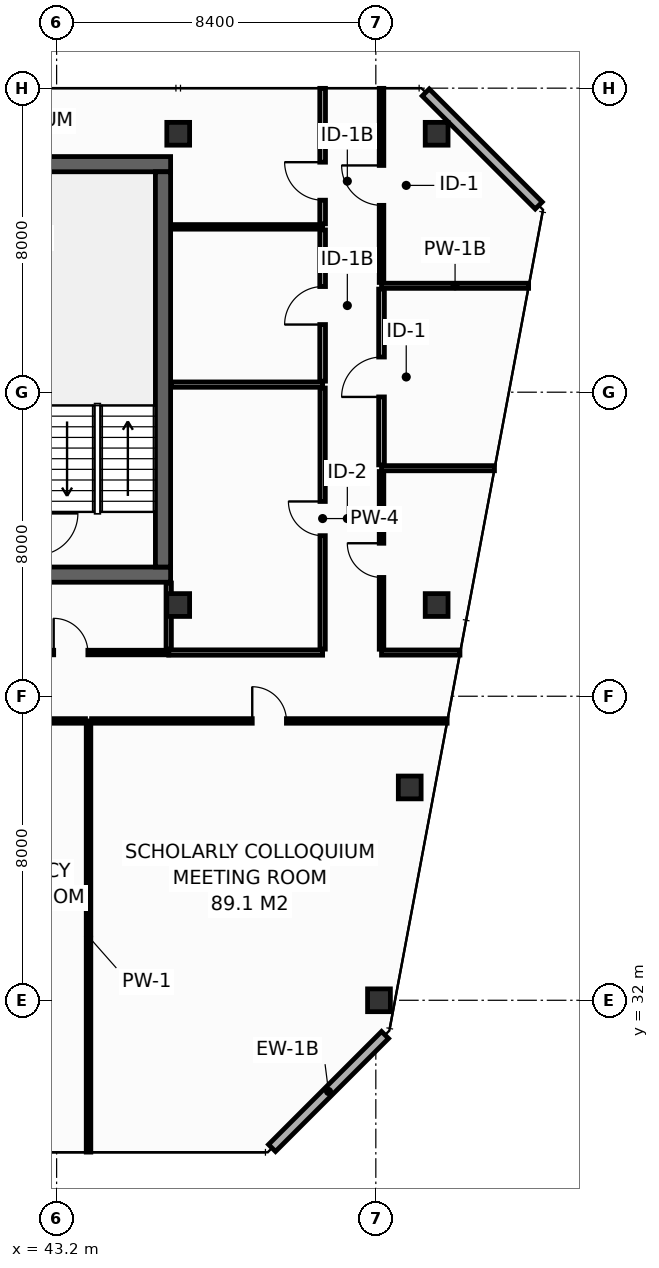
"""IFC4 building model, lengths in metres.
Left out: names, types, materials, properties, quantities, classifications, styles, units other than length and angle.
Written with IfcOpenShell. Run it as: python <this file> out.ifc"""

import sys

from ifc_helpers import new_model, si_unit, direction, frame, frame_2d, origin, origin_2d, place, context, subcontext, project, spatial, rectangle, hollow_rectangle, extrude, element, fill, save


model = new_model("IFC4")
c1 = context("Model", 3, precision=1e-05, world=origin(), true_north=direction((0.0, 1.0)))
c2 = subcontext(c1, "Body", "Model", "MODEL_VIEW")
j1 = project(units=[si_unit("LENGTHUNIT", "METRE"), si_unit("PLANEANGLEUNIT", "RADIAN")], contexts=[c1])
p1 = place(None, origin())
s1 = spatial("IfcSite", under=j1, at=p1, CompositionType="ELEMENT")
p2 = place(p1, origin())
s2 = spatial("IfcBuilding", under=s1, at=p2, CompositionType="ELEMENT")
p3 = place(p2, frame((0.0, 0.0, 291.4)))
s3 = spatial("IfcBuildingStorey", under=s2, at=p3, CompositionType="ELEMENT", Elevation=291.4)
p4 = place(p3, frame((13.7, 43.2, 0.0), z_axis=(0.0, 0.0, 1.0), x_axis=(1.0, 0.0, 0.0)))
e1 = element("IfcWall", 1, at=p4, inside=s3, PredefinedType="SHEAR", context=c2, shape_type="SweptSolid", body=[
    extrude(rectangle(XDim=32.5, YDim=0.4, at=frame_2d((16.25, 0.0))), origin(), (0.0, 0.0, 1.0), 3.55),
])
p5 = place(p4, frame((5.4, 0.0, 0.0)))
e2 = element("IfcOpeningElement", 2, at=p5, cuts=e1, PredefinedType="OPENING", context=c2, shape_type="SweptSolid", body=[
    extrude(rectangle(XDim=1.1, YDim=2.15, at=frame_2d((0.55, 1.075))), frame((0.0, 0.21, 0.0), z_axis=(0.0, -1.0, 0.0), x_axis=(1.0, 0.0, 0.0)), (0.0, 0.0, 1.0), 0.42),
])
p6 = place(p4, frame((25.6, 0.0, 0.0)))
e3 = element("IfcOpeningElement", 3, at=p6, cuts=e1, PredefinedType="OPENING", context=c2, shape_type="SweptSolid", body=[
    extrude(rectangle(XDim=1.1, YDim=2.15, at=frame_2d((0.55, 1.075))), frame((0.0, 0.21, 0.0), z_axis=(0.0, -1.0, 0.0), x_axis=(1.0, 0.0, 0.0)), (0.0, 0.0, 1.0), 0.42),
])
p7 = place(p3, frame((13.7, 54.0, 0.0), z_axis=(0.0, 0.0, 1.0), x_axis=(1.0, 0.0, 0.0)))
e4 = element("IfcWall", 4, at=p7, inside=s3, PredefinedType="SHEAR", context=c2, shape_type="SweptSolid", body=[
    extrude(rectangle(XDim=32.5, YDim=0.4, at=frame_2d((16.25, 0.0))), origin(), (0.0, 0.0, 1.0), 3.55),
])
p8 = place(p3, frame((46.0, 43.4, 0.0), z_axis=(0.0, 0.0, 1.0), x_axis=(0.0, 1.0, 0.0)))
e5 = element("IfcWall", 5, at=p8, inside=s3, PredefinedType="SHEAR", context=c2, shape_type="SweptSolid", body=[
    extrude(rectangle(XDim=10.4, YDim=0.4, at=frame_2d((5.2, 0.0))), origin(), (0.0, 0.0, 1.0), 3.55),
])
for number, where, z_axis, x_axis in (
    (6, (46.4, 54.8, 0.0), (0.0, 0.0, 1.0), (1.0, 0.0, 0.0)),
    (7, (53.2, 54.8, 0.0), (0.0, 0.0, 1.0), (1.0, 0.0, 0.0)),
    (8, (46.4, 42.4, 0.0), (0.0, 0.0, 1.0), (1.0, 0.0, 0.0)),
    (9, (53.2, 42.4, 0.0), (0.0, 0.0, 1.0), (1.0, 0.0, 0.0)),
    (10, (51.683, 32.0, 0.0), (0.0, 0.0, 1.0), (1.0, 0.0, 0.0)),
    (11, (52.492, 37.6, 0.0), (0.0, 0.0, 1.0), (1.0, 0.0, 0.0)),
):
    element("IfcColumn", number, at=place(p3, frame(where, z_axis=z_axis, x_axis=x_axis)), inside=s3, PredefinedType="COLUMN", context=c2, shape_type="SweptSolid", body=[
        extrude(hollow_rectangle(XDim=0.6, YDim=0.6, WallThickness=0.028, at=origin_2d()), origin(), (0.0, 0.0, 1.0), 3.8),
    ])
for number, where, z_axis, x_axis in (
    (12, (48.869, 28.113, 0.0), (0.0, 0.0, 1.0), (0.707, 0.707, 0.0)),
    (13, (55.887, 52.913, 0.0), (0.0, 0.0, 1.0), (-0.707, 0.707, 0.0)),
):
    element("IfcWall", number, at=place(p3, frame(where, z_axis=z_axis, x_axis=x_axis)), inside=s3, PredefinedType="STANDARD", context=c2, shape_type="SweptSolid", body=[
        extrude(rectangle(XDim=4.206, YDim=0.26, at=frame_2d((2.103, 0.0))), origin(), (0.0, 0.0, 1.0), 3.55),
    ])
p9 = place(p3, frame((46.15, 41.15, 0.0), z_axis=(0.0, 0.0, 1.0), x_axis=(1.0, 0.0, 0.0)))
e14 = element("IfcWall", 14, at=p9, inside=s3, PredefinedType="PARTITIONING", context=c2, shape_type="SweptSolid", body=[
    extrude(rectangle(XDim=4.05, YDim=0.14, at=frame_2d((2.025, 0.0))), origin(), (0.0, 0.0, 1.0), 3.55),
])
p10 = place(p3, frame((46.15, 41.24, 0.0), z_axis=(0.0, 0.0, 1.0), x_axis=(0.0, 1.0, 0.0)))
e15 = element("IfcWall", 15, at=p10, inside=s3, PredefinedType="PARTITIONING", context=c2, shape_type="SweptSolid", body=[
    extrude(rectangle(XDim=1.74, YDim=0.14, at=frame_2d((0.87, 0.0))), origin(), (0.0, 0.0, 1.0), 3.55),
])
p11 = place(p3, frame((46.22, 48.2, 0.0), z_axis=(0.0, 0.0, 1.0), x_axis=(1.0, 0.0, 0.0)))
e16 = element("IfcWall", 16, at=p11, inside=s3, PredefinedType="PARTITIONING", context=c2, shape_type="SweptSolid", body=[
    extrude(rectangle(XDim=3.98, YDim=0.14, at=frame_2d((1.99, 0.0))), origin(), (0.0, 0.0, 1.0), 3.55),
])
p12 = place(p3, frame((50.2, 41.24, 0.0), z_axis=(0.0, 0.0, 1.0), x_axis=(0.0, 1.0, 0.0)))
e17 = element("IfcWall", 17, at=p12, inside=s3, PredefinedType="PARTITIONING", context=c2, shape_type="SweptSolid", body=[
    extrude(rectangle(XDim=6.87, YDim=0.14, at=frame_2d((3.435, 0.0))), origin(), (0.0, 0.0, 1.0), 2.947),
])
p13 = place(p12, frame((2.985, 0.0, 0.0)))
e18 = element("IfcOpeningElement", 18, at=p13, cuts=e17, PredefinedType="OPENING", context=c2, shape_type="SweptSolid", body=[
    extrude(rectangle(XDim=0.9, YDim=2.1, at=frame_2d((0.45, 1.05))), frame((0.0, 0.08, 0.0), z_axis=(0.0, -1.0, 0.0), x_axis=(1.0, 0.0, 0.0)), (0.0, 0.0, 1.0), 0.16),
])
p14 = place(p3, frame((46.22, 52.35, 0.0), z_axis=(0.0, 0.0, 1.0), x_axis=(1.0, 0.0, 0.0)))
e19 = element("IfcWall", 19, at=p14, inside=s3, PredefinedType="PARTITIONING", context=c2, shape_type="SweptSolid", body=[
    extrude(rectangle(XDim=3.98, YDim=0.12, at=frame_2d((1.99, 0.0))), origin(), (0.0, 0.0, 1.0), 3.55),
])
p15 = place(p3, frame((50.2, 48.29, 0.0), z_axis=(0.0, 0.0, 1.0), x_axis=(0.0, 1.0, 0.0)))
e20 = element("IfcWall", 20, at=p15, inside=s3, PredefinedType="PARTITIONING", context=c2, shape_type="SweptSolid", body=[
    extrude(rectangle(XDim=3.98, YDim=0.15, at=frame_2d((1.99, 0.0))), origin(), (0.0, 0.0, 1.0), 3.55),
])
p16 = place(p15, frame((1.49, 0.0, 0.0)))
e21 = element("IfcOpeningElement", 21, at=p16, cuts=e20, PredefinedType="OPENING", context=c2, shape_type="SweptSolid", body=[
    extrude(rectangle(XDim=1.0, YDim=2.15, at=frame_2d((0.5, 1.075))), frame((0.0, 0.085, 0.0), z_axis=(0.0, -1.0, 0.0), x_axis=(1.0, 0.0, 0.0)), (0.0, 0.0, 1.0), 0.17),
])
p17 = place(p3, frame((50.2, 52.43, 0.0), z_axis=(0.0, 0.0, 1.0), x_axis=(0.0, 1.0, 0.0)))
e22 = element("IfcWall", 22, at=p17, inside=s3, PredefinedType="PARTITIONING", context=c2, shape_type="SweptSolid", body=[
    extrude(rectangle(XDim=3.565, YDim=0.15, at=frame_2d((1.783, 0.0))), origin(), (0.0, 0.0, 1.0), 2.935),
])
p18 = place(p17, frame((0.622, 0.0, 0.0)))
e23 = element("IfcOpeningElement", 23, at=p18, cuts=e22, PredefinedType="OPENING", context=c2, shape_type="SweptSolid", body=[
    extrude(rectangle(XDim=1.0, YDim=2.15, at=frame_2d((0.5, 1.075))), frame((0.0, 0.085, 0.0), z_axis=(0.0, -1.0, 0.0), x_axis=(1.0, 0.0, 0.0)), (0.0, 0.0, 1.0), 0.17),
])
p19 = place(p3, frame((51.75, 41.15, 0.0), z_axis=(0.0, 0.0, 1.0), x_axis=(1.0, 0.0, 0.0)))
e24 = element("IfcWall", 24, at=p19, inside=s3, PredefinedType="PARTITIONING", context=c2, shape_type="SweptSolid", body=[
    extrude(rectangle(XDim=2.064, YDim=0.135, at=frame_2d((1.032, 0.0))), origin(), (0.0, 0.0, 1.0), 3.085),
])
p20 = place(p3, frame((51.75, 46.0, 0.0), z_axis=(0.0, 0.0, 1.0), x_axis=(1.0, 0.0, 0.0)))
e25 = element("IfcWall", 25, at=p20, inside=s3, PredefinedType="PARTITIONING", context=c2, shape_type="SweptSolid", body=[
    extrude(rectangle(XDim=2.972, YDim=0.135, at=frame_2d((1.486, 0.0))), origin(), (0.0, 0.0, 1.0), 2.947),
])
p21 = place(p3, frame((51.75, 50.8, 0.0), z_axis=(0.0, 0.0, 1.0), x_axis=(1.0, 0.0, 0.0)))
e26 = element("IfcWall", 26, at=p21, inside=s3, PredefinedType="PARTITIONING", context=c2, shape_type="SweptSolid", body=[
    extrude(rectangle(XDim=3.87, YDim=0.135, at=frame_2d((1.935, 0.0))), origin(), (0.0, 0.0, 1.0), 2.947),
])
p22 = place(p3, frame((51.75, 41.238, 0.0), z_axis=(0.0, 0.0, 1.0), x_axis=(0.0, 1.0, 0.0)))
e27 = element("IfcWall", 27, at=p22, inside=s3, PredefinedType="PARTITIONING", context=c2, shape_type="SweptSolid", body=[
    extrude(rectangle(XDim=4.675, YDim=0.12, at=frame_2d((2.337, 0.0))), origin(), (0.0, 0.0, 1.0), 2.947),
])
p23 = place(p22, frame((1.888, 0.0, 0.0)))
e28 = element("IfcOpeningElement", 28, at=p23, cuts=e27, PredefinedType="OPENING", context=c2, shape_type="SweptSolid", body=[
    extrude(rectangle(XDim=0.9, YDim=2.1, at=frame_2d((0.45, 1.05))), frame((0.0, 0.07, 0.0), z_axis=(0.0, -1.0, 0.0), x_axis=(1.0, 0.0, 0.0)), (0.0, 0.0, 1.0), 0.14),
])
p24 = place(p3, frame((51.75, 46.087, 0.0), z_axis=(0.0, 0.0, 1.0), x_axis=(0.0, 1.0, 0.0)))
e29 = element("IfcWall", 29, at=p24, inside=s3, PredefinedType="PARTITIONING", context=c2, shape_type="SweptSolid", body=[
    extrude(rectangle(XDim=4.625, YDim=0.15, at=frame_2d((2.312, 0.0))), origin(), (0.0, 0.0, 1.0), 3.55),
])
p25 = place(p24, frame((1.788, 0.0, 0.0)))
e30 = element("IfcOpeningElement", 30, at=p25, cuts=e29, PredefinedType="OPENING", context=c2, shape_type="SweptSolid", body=[
    extrude(rectangle(XDim=1.05, YDim=2.15, at=frame_2d((0.525, 1.075))), frame((0.0, 0.085, 0.0), z_axis=(0.0, -1.0, 0.0), x_axis=(1.0, 0.0, 0.0)), (0.0, 0.0, 1.0), 0.17),
])
p26 = place(p3, frame((51.75, 50.887, 0.0), z_axis=(0.0, 0.0, 1.0), x_axis=(0.0, 1.0, 0.0)))
e31 = element("IfcWall", 31, at=p26, inside=s3, PredefinedType="PARTITIONING", context=c2, shape_type="SweptSolid", body=[
    extrude(rectangle(XDim=5.108, YDim=0.12, at=frame_2d((2.554, 0.0))), origin(), (0.0, 0.0, 1.0), 2.935),
])
p27 = place(p26, frame((2.029, 0.0, 0.0)))
e32 = element("IfcOpeningElement", 32, at=p27, cuts=e31, PredefinedType="OPENING", context=c2, shape_type="SweptSolid", body=[
    extrude(rectangle(XDim=1.05, YDim=2.15, at=frame_2d((0.525, 1.075))), frame((0.0, 0.07, 0.0), z_axis=(0.0, -1.0, 0.0), x_axis=(1.0, 0.0, 0.0)), (0.0, 0.0, 1.0), 0.14),
])
p28 = place(p3, frame((40.995, 41.15, 0.0), z_axis=(0.0, 0.0, 1.0), x_axis=(1.0, 0.0, 0.0)))
e33 = element("IfcWall", 33, at=p28, inside=s3, PredefinedType="PARTITIONING", context=c2, shape_type="SweptSolid", body=[
    extrude(rectangle(XDim=5.155, YDim=0.12, at=frame_2d((2.577, 0.0))), origin(), (0.0, 0.0, 1.0), 3.55),
])
p29 = place(p28, frame((2.128, 0.0, 0.0)))
e34 = element("IfcOpeningElement", 34, at=p29, cuts=e33, PredefinedType="OPENING", context=c2, shape_type="SweptSolid", body=[
    extrude(rectangle(XDim=0.9, YDim=2.1, at=frame_2d((0.45, 1.05))), frame((0.0, 0.07, 0.0), z_axis=(0.0, -1.0, 0.0), x_axis=(1.0, 0.0, 0.0)), (0.0, 0.0, 1.0), 0.14),
])
p30 = place(p3, frame((44.04, 28.005, 0.0), z_axis=(0.0, 0.0, 1.0), x_axis=(0.0, 1.0, 0.0)))
e35 = element("IfcWall", 35, at=p30, inside=s3, PredefinedType="PARTITIONING", context=c2, shape_type="SweptSolid", body=[
    extrude(rectangle(XDim=11.345, YDim=0.12, at=frame_2d((5.673, 0.0))), origin(), (0.0, 0.0, 1.0), 1.735),
])
p31 = place(p3, frame((39.876, 39.35, 0.0), z_axis=(0.0, 0.0, 1.0), x_axis=(1.0, 0.0, 0.0)))
e36 = element("IfcWall", 36, at=p31, inside=s3, PredefinedType="PARTITIONING", context=c2, shape_type="SweptSolid", body=[
    extrude(rectangle(XDim=4.084, YDim=0.12, at=frame_2d((2.042, 0.0))), origin(), (0.0, 0.0, 1.0), 3.55),
])
p32 = place(p3, frame((44.12, 39.35, 0.0), z_axis=(0.0, 0.0, 1.0), x_axis=(1.0, 0.0, 0.0)))
e37 = element("IfcWall", 37, at=p32, inside=s3, PredefinedType="PARTITIONING", context=c2, shape_type="SweptSolid", body=[
    extrude(rectangle(XDim=9.356, YDim=0.12, at=frame_2d((4.678, 0.0))), origin(), (0.0, 0.0, 1.0), 3.085),
])
p33 = place(p32, frame((4.228, 0.0, 0.0)))
e38 = element("IfcOpeningElement", 38, at=p33, cuts=e37, PredefinedType="OPENING", context=c2, shape_type="SweptSolid", body=[
    extrude(rectangle(XDim=0.9, YDim=2.1, at=frame_2d((0.45, 1.05))), frame((0.0, 0.07, 0.0), z_axis=(0.0, -1.0, 0.0), x_axis=(1.0, 0.0, 0.0)), (0.0, 0.0, 1.0), 0.14),
])
p34 = place(p13, origin())
e39 = element("IfcDoor", 39, at=p34, inside=s3, OperationType="SINGLE_SWING_RIGHT", PredefinedType="DOOR", context=c2, shape_type="SweptSolid", body=[
    extrude(rectangle(XDim=0.9, YDim=2.1, at=frame_2d((0.45, 1.05))), frame((0.0, 0.025, 0.0), z_axis=(0.0, -1.0, 0.0), x_axis=(1.0, 0.0, 0.0)), (0.0, 0.0, 1.0), 0.05),
])
fill(e18, e39)
p35 = place(p16, origin())
e40 = element("IfcDoor", 40, at=p35, inside=s3, OperationType="SINGLE_SWING_LEFT", PredefinedType="DOOR", context=c2, shape_type="SweptSolid", body=[
    extrude(rectangle(XDim=1.0, YDim=2.15, at=frame_2d((0.5, 1.075))), frame((0.0, 0.025, 0.0), z_axis=(0.0, -1.0, 0.0), x_axis=(1.0, 0.0, 0.0)), (0.0, 0.0, 1.0), 0.05),
])
fill(e21, e40)
p36 = place(p18, origin())
e41 = element("IfcDoor", 41, at=p36, inside=s3, OperationType="SINGLE_SWING_RIGHT", PredefinedType="DOOR", context=c2, shape_type="SweptSolid", body=[
    extrude(rectangle(XDim=1.0, YDim=2.15, at=frame_2d((0.5, 1.075))), frame((0.0, 0.025, 0.0), z_axis=(0.0, -1.0, 0.0), x_axis=(1.0, 0.0, 0.0)), (0.0, 0.0, 1.0), 0.05),
])
fill(e23, e41)
p37 = place(p23, origin())
e42 = element("IfcDoor", 42, at=p37, inside=s3, OperationType="SINGLE_SWING_RIGHT", PredefinedType="DOOR", context=c2, shape_type="SweptSolid", body=[
    extrude(rectangle(XDim=0.9, YDim=2.1, at=frame_2d((0.45, 1.05))), frame((0.0, 0.025, 0.0), z_axis=(0.0, -1.0, 0.0), x_axis=(1.0, 0.0, 0.0)), (0.0, 0.0, 1.0), 0.05),
])
fill(e28, e42)
p38 = place(p25, origin())
e43 = element("IfcDoor", 43, at=p38, inside=s3, OperationType="SINGLE_SWING_LEFT", PredefinedType="DOOR", context=c2, shape_type="SweptSolid", body=[
    extrude(rectangle(XDim=1.05, YDim=2.15, at=frame_2d((0.525, 1.075))), frame((0.0, 0.025, 0.0), z_axis=(0.0, -1.0, 0.0), x_axis=(1.0, 0.0, 0.0)), (0.0, 0.0, 1.0), 0.05),
])
fill(e30, e43)
p39 = place(p27, origin())
e44 = element("IfcDoor", 44, at=p39, inside=s3, OperationType="SINGLE_SWING_RIGHT", PredefinedType="DOOR", context=c2, shape_type="SweptSolid", body=[
    extrude(rectangle(XDim=1.05, YDim=2.15, at=frame_2d((0.525, 1.075))), frame((0.0, 0.025, 0.0), z_axis=(0.0, -1.0, 0.0), x_axis=(1.0, 0.0, 0.0)), (0.0, 0.0, 1.0), 0.05),
])
fill(e32, e44)
p40 = place(p29, origin())
e45 = element("IfcDoor", 45, at=p40, inside=s3, OperationType="SINGLE_SWING_LEFT", PredefinedType="DOOR", context=c2, shape_type="SweptSolid", body=[
    extrude(rectangle(XDim=0.9, YDim=2.1, at=frame_2d((0.45, 1.05))), frame((0.0, 0.025, 0.0), z_axis=(0.0, -1.0, 0.0), x_axis=(1.0, 0.0, 0.0)), (0.0, 0.0, 1.0), 0.05),
])
fill(e34, e45)
p41 = place(p33, origin())
e46 = element("IfcDoor", 46, at=p41, inside=s3, OperationType="SINGLE_SWING_LEFT", PredefinedType="DOOR", context=c2, shape_type="SweptSolid", body=[
    extrude(rectangle(XDim=0.9, YDim=2.1, at=frame_2d((0.45, 1.05))), frame((0.0, 0.025, 0.0), z_axis=(0.0, -1.0, 0.0), x_axis=(1.0, 0.0, 0.0)), (0.0, 0.0, 1.0), 0.05),
])
fill(e38, e46)
save(model, sys.argv[1])
